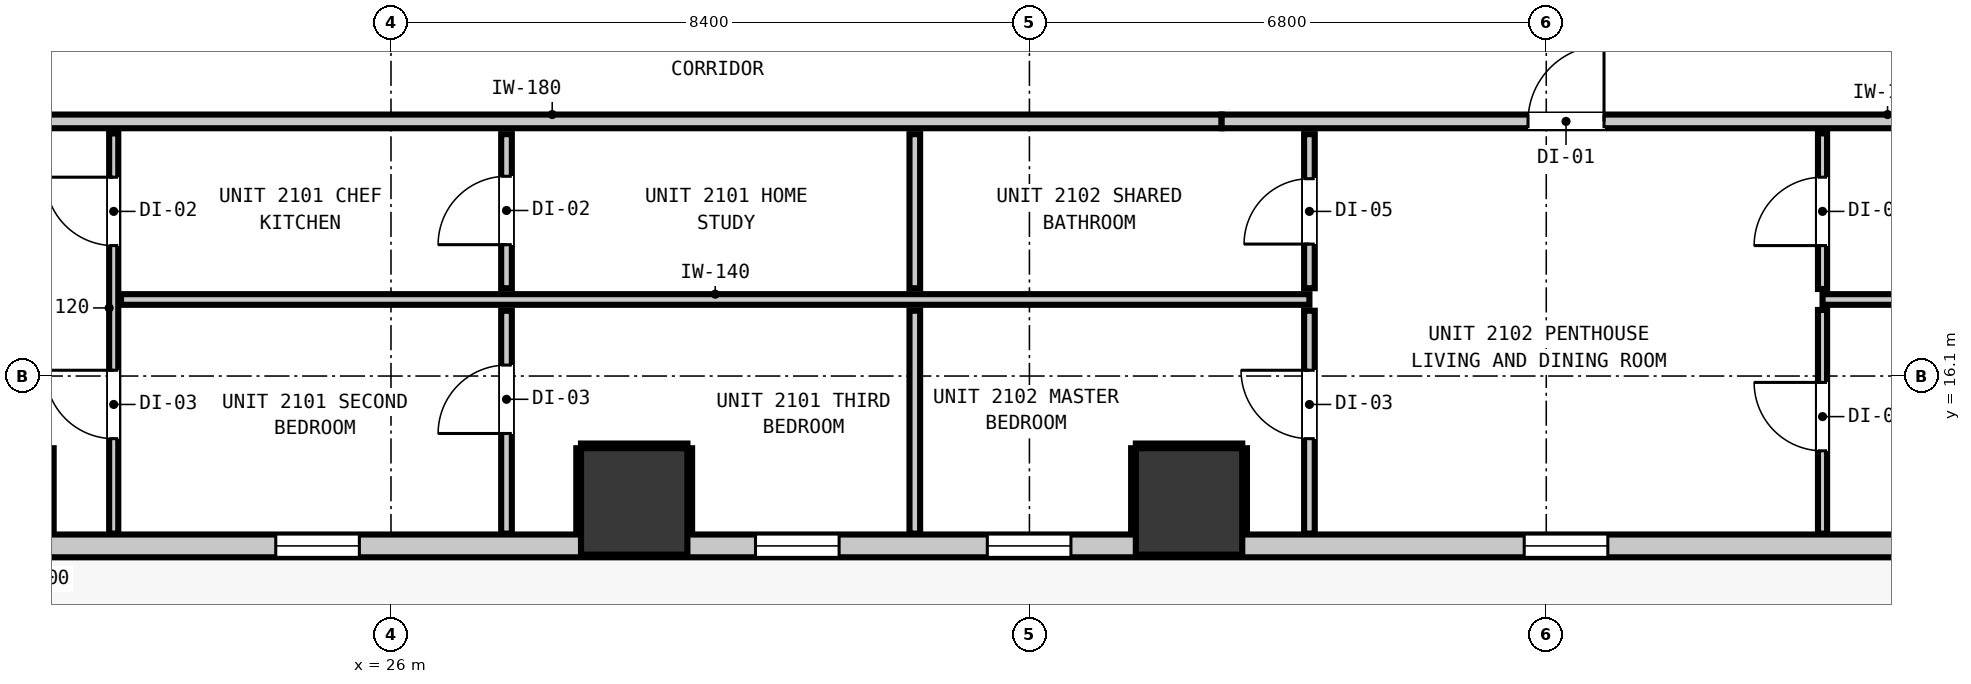
"""IFC4 building model, lengths in metres.
Left out: names, types, materials, properties, quantities, classifications, styles, units other than length and angle.
Written with IfcOpenShell. Run it as: python <this file> out.ifc"""

import sys

from ifc_helpers import new_model, si_unit, direction, frame, frame_2d, origin, origin_2d, place, context, subcontext, project, spatial, rectangle, extrude, element, fill, save


model = new_model("IFC4")
c1 = context("Model", 3, precision=1e-05, world=origin(), true_north=direction((0.0, 1.0)))
c2 = subcontext(c1, "Body", "Model", "MODEL_VIEW")
j1 = project(units=[si_unit("LENGTHUNIT", "METRE"), si_unit("PLANEANGLEUNIT", "RADIAN")], contexts=[c1])
p1 = place(None, origin())
s1 = spatial("IfcSite", under=j1, at=p1, CompositionType="ELEMENT")
p2 = place(p1, origin())
s2 = spatial("IfcBuilding", under=s1, at=p2, CompositionType="ELEMENT")
p3 = place(p2, frame((0.0, 0.0, 75.12)))
s3 = spatial("IfcBuildingStorey", under=s2, at=p3, CompositionType="ELEMENT", Elevation=75.12)
for number, where, z_axis, x_axis in (
    (1, (29.2, 14.45, 0.0), (0.0, 0.0, 1.0), (1.0, 0.0, 0.0)),
    (2, (36.5, 14.45, 0.0), (0.0, 0.0, 1.0), (1.0, 0.0, 0.0)),
):
    element("IfcColumn", number, at=place(p3, frame(where, z_axis=z_axis, x_axis=x_axis)), inside=s3, PredefinedType="COLUMN", context=c2, shape_type="SweptSolid", body=[
        extrude(rectangle(XDim=1.4, YDim=1.4, at=origin_2d()), origin(), (0.0, 0.0, 1.0), 3.32),
    ])
p4 = place(p3, frame((47.835, 13.865, 0.0), z_axis=(0.0, 0.0, 1.0), x_axis=(-1.0, 0.0, 0.0)))
e3 = element("IfcWall", 3, at=p4, inside=s3, PredefinedType="STANDARD", context=c2, shape_type="SweptSolid", body=[
    extrude(rectangle(XDim=37.47, YDim=0.3, at=frame_2d((18.735, 0.0))), origin(), (0.0, 0.0, 1.0), 3.06),
])
p5 = place(p4, frame((0.901, 0.0, 0.0)))
e4 = element("IfcOpeningElement", 4, at=p5, cuts=e3, PredefinedType="OPENING", context=c2, shape_type="SweptSolid", body=[
    extrude(rectangle(XDim=1.0, YDim=2.15, at=frame_2d((0.5, 1.075))), frame((0.0, 0.16, 0.0), z_axis=(0.0, -1.0, 0.0), x_axis=(1.0, 0.0, 0.0)), (0.0, 0.0, 1.0), 0.32),
])
p6 = place(p4, frame((29.695, 0.0, 0.85)))
e5 = element("IfcOpeningElement", 5, at=p6, cuts=e3, PredefinedType="OPENING", context=c2, shape_type="SweptSolid", body=[
    extrude(rectangle(XDim=1.1, YDim=2.05, at=frame_2d((0.55, 1.025))), frame((0.0, 0.16, 0.0), z_axis=(0.0, -1.0, 0.0), x_axis=(1.0, 0.0, 0.0)), (0.0, 0.0, 1.0), 0.32),
])
p7 = place(p4, frame((35.708, 0.0, 0.85)))
e6 = element("IfcOpeningElement", 6, at=p7, cuts=e3, PredefinedType="OPENING", context=c2, shape_type="SweptSolid", body=[
    extrude(rectangle(XDim=1.1, YDim=2.05, at=frame_2d((0.55, 1.025))), frame((0.0, 0.16, 0.0), z_axis=(0.0, -1.0, 0.0), x_axis=(1.0, 0.0, 0.0)), (0.0, 0.0, 1.0), 0.32),
])
p8 = place(p4, frame((22.251, 0.0, 0.85)))
e7 = element("IfcOpeningElement", 7, at=p8, cuts=e3, PredefinedType="OPENING", context=c2, shape_type="SweptSolid", body=[
    extrude(rectangle(XDim=1.1, YDim=2.05, at=frame_2d((0.55, 1.025))), frame((0.0, 0.16, 0.0), z_axis=(0.0, -1.0, 0.0), x_axis=(1.0, 0.0, 0.0)), (0.0, 0.0, 1.0), 0.32),
])
p9 = place(p4, frame((15.939, 0.0, 0.85)))
e8 = element("IfcOpeningElement", 8, at=p9, cuts=e3, PredefinedType="OPENING", context=c2, shape_type="SweptSolid", body=[
    extrude(rectangle(XDim=1.1, YDim=2.05, at=frame_2d((0.55, 1.025))), frame((0.0, 0.16, 0.0), z_axis=(0.0, -1.0, 0.0), x_axis=(1.0, 0.0, 0.0)), (0.0, 0.0, 1.0), 0.32),
])
p10 = place(p4, frame((5.825, 0.0, 0.85)))
e9 = element("IfcOpeningElement", 9, at=p10, cuts=e3, PredefinedType="OPENING", context=c2, shape_type="SweptSolid", body=[
    extrude(rectangle(XDim=1.1, YDim=2.05, at=frame_2d((0.55, 1.025))), frame((0.0, 0.16, 0.0), z_axis=(0.0, -1.0, 0.0), x_axis=(1.0, 0.0, 0.0)), (0.0, 0.0, 1.0), 0.32),
])
p11 = place(p4, frame((12.889, 0.0, 0.85)))
e10 = element("IfcOpeningElement", 10, at=p11, cuts=e3, PredefinedType="OPENING", context=c2, shape_type="SweptSolid", body=[
    extrude(rectangle(XDim=1.1, YDim=2.05, at=frame_2d((0.55, 1.025))), frame((0.0, 0.16, 0.0), z_axis=(0.0, -1.0, 0.0), x_axis=(1.0, 0.0, 0.0)), (0.0, 0.0, 1.0), 0.32),
])
p12 = place(p3, frame((8.027, 19.45, 0.0), z_axis=(0.0, 0.0, 1.0), x_axis=(1.0, 0.0, 0.0)))
e11 = element("IfcWall", 11, at=p12, inside=s3, PredefinedType="PARTITIONING", context=c2, shape_type="SweptSolid", body=[
    extrude(rectangle(XDim=28.902, YDim=0.18, at=frame_2d((14.451, 0.0))), origin(), (0.0, 0.0, 1.0), 3.06),
])
p13 = place(p12, frame((10.187, 0.0, 0.0)))
e12 = element("IfcOpeningElement", 12, at=p13, cuts=e11, PredefinedType="OPENING", context=c2, shape_type="SweptSolid", body=[
    extrude(rectangle(XDim=1.0, YDim=2.15, at=frame_2d((0.5, 1.075))), frame((0.0, 0.1, 0.0), z_axis=(0.0, -1.0, 0.0), x_axis=(1.0, 0.0, 0.0)), (0.0, 0.0, 1.0), 0.2),
])
p14 = place(p3, frame((36.929, 19.45, 0.0), z_axis=(0.0, 0.0, 1.0), x_axis=(1.0, 0.0, 0.0)))
e13 = element("IfcWall", 13, at=p14, inside=s3, PredefinedType="PARTITIONING", context=c2, shape_type="SweptSolid", body=[
    extrude(rectangle(XDim=12.392, YDim=0.18, at=frame_2d((6.196, 0.0))), origin(), (0.0, 0.0, 1.0), 2.445),
])
p15 = place(p14, frame((4.031, 0.0, 0.0)))
e14 = element("IfcOpeningElement", 14, at=p15, cuts=e13, PredefinedType="OPENING", context=c2, shape_type="SweptSolid", body=[
    extrude(rectangle(XDim=1.0, YDim=2.15, at=frame_2d((0.5, 1.075))), frame((0.0, 0.1, 0.0), z_axis=(0.0, -1.0, 0.0), x_axis=(1.0, 0.0, 0.0)), (0.0, 0.0, 1.0), 0.2),
])
p16 = place(p3, frame((22.448, 17.107, 0.0), z_axis=(0.0, 0.0, 1.0), x_axis=(1.0, 0.0, 0.0)))
e15 = element("IfcWall", 15, at=p16, inside=s3, PredefinedType="PARTITIONING", context=c2, shape_type="SweptSolid", body=[
    extrude(rectangle(XDim=15.636, YDim=0.14, at=frame_2d((7.818, 0.0))), origin(), (0.0, 0.0, 1.0), 3.06),
])
p17 = place(p3, frame((44.835, 17.107, 0.0), z_axis=(0.0, 0.0, 1.0), x_axis=(1.0, 0.0, 0.0)))
e16 = element("IfcWall", 16, at=p17, inside=s3, PredefinedType="PARTITIONING", context=c2, shape_type="SweptSolid", body=[
    extrude(rectangle(XDim=5.338, YDim=0.14, at=frame_2d((2.669, 0.0))), origin(), (0.0, 0.0, 1.0), 3.06),
])
p18 = place(p3, frame((27.52, 14.027, 0.0), z_axis=(0.0, 0.0, 1.0), x_axis=(0.0, 1.0, 0.0)))
e17 = element("IfcWall", 17, at=p18, inside=s3, PredefinedType="PARTITIONING", context=c2, shape_type="SweptSolid", body=[
    extrude(rectangle(XDim=2.932, YDim=0.14, at=frame_2d((1.466, 0.0))), origin(), (0.0, 0.0, 1.0), 3.06),
])
p19 = place(p18, frame((1.317, 0.0, 0.0)))
e18 = element("IfcOpeningElement", 18, at=p19, cuts=e17, PredefinedType="OPENING", context=c2, shape_type="SweptSolid", body=[
    extrude(rectangle(XDim=0.9, YDim=2.1, at=frame_2d((0.45, 1.05))), frame((0.0, 0.08, 0.0), z_axis=(0.0, -1.0, 0.0), x_axis=(1.0, 0.0, 0.0)), (0.0, 0.0, 1.0), 0.16),
])
p20 = place(p3, frame((27.52, 17.255, 0.0), z_axis=(0.0, 0.0, 1.0), x_axis=(0.0, 1.0, 0.0)))
e19 = element("IfcWall", 19, at=p20, inside=s3, PredefinedType="PARTITIONING", context=c2, shape_type="SweptSolid", body=[
    extrude(rectangle(XDim=2.027, YDim=0.14, at=frame_2d((1.014, 0.0))), origin(), (0.0, 0.0, 1.0), 3.06),
])
p21 = place(p20, frame((0.573, 0.0, 0.0)))
e20 = element("IfcOpeningElement", 20, at=p21, cuts=e19, PredefinedType="OPENING", context=c2, shape_type="SweptSolid", body=[
    extrude(rectangle(XDim=0.9, YDim=2.1, at=frame_2d((0.45, 1.05))), frame((0.0, 0.08, 0.0), z_axis=(0.0, -1.0, 0.0), x_axis=(1.0, 0.0, 0.0)), (0.0, 0.0, 1.0), 0.16),
])
p22 = place(p3, frame((32.892, 14.027, 0.0), z_axis=(0.0, 0.0, 1.0), x_axis=(0.0, 1.0, 0.0)))
e21 = element("IfcWall", 21, at=p22, inside=s3, PredefinedType="PARTITIONING", context=c2, shape_type="SweptSolid", body=[
    extrude(rectangle(XDim=2.932, YDim=0.14, at=frame_2d((1.466, 0.0))), origin(), (0.0, 0.0, 1.0), 3.06),
])
p23 = place(p3, frame((32.892, 17.255, 0.0), z_axis=(0.0, 0.0, 1.0), x_axis=(0.0, 1.0, 0.0)))
e22 = element("IfcWall", 22, at=p23, inside=s3, PredefinedType="PARTITIONING", context=c2, shape_type="SweptSolid", body=[
    extrude(rectangle(XDim=2.027, YDim=0.14, at=frame_2d((1.014, 0.0))), origin(), (0.0, 0.0, 1.0), 3.06),
])
p24 = place(p3, frame((38.084, 14.027, 0.0), z_axis=(0.0, 0.0, 1.0), x_axis=(0.0, 1.0, 0.0)))
e23 = element("IfcWall", 23, at=p24, inside=s3, PredefinedType="PARTITIONING", context=c2, shape_type="SweptSolid", body=[
    extrude(rectangle(XDim=2.932, YDim=0.14, at=frame_2d((1.466, 0.0))), origin(), (0.0, 0.0, 1.0), 3.06),
])
p25 = place(p24, frame((1.249, 0.0, 0.0)))
e24 = element("IfcOpeningElement", 24, at=p25, cuts=e23, PredefinedType="OPENING", context=c2, shape_type="SweptSolid", body=[
    extrude(rectangle(XDim=0.9, YDim=2.1, at=frame_2d((0.45, 1.05))), frame((0.0, 0.08, 0.0), z_axis=(0.0, -1.0, 0.0), x_axis=(1.0, 0.0, 0.0)), (0.0, 0.0, 1.0), 0.16),
])
p26 = place(p3, frame((38.084, 17.255, 0.0), z_axis=(0.0, 0.0, 1.0), x_axis=(0.0, 1.0, 0.0)))
e25 = element("IfcWall", 25, at=p26, inside=s3, PredefinedType="PARTITIONING", context=c2, shape_type="SweptSolid", body=[
    extrude(rectangle(XDim=2.027, YDim=0.14, at=frame_2d((1.014, 0.0))), origin(), (0.0, 0.0, 1.0), 3.06),
])
p27 = place(p26, frame((0.581, 0.0, 0.0)))
e26 = element("IfcOpeningElement", 26, at=p27, cuts=e25, PredefinedType="OPENING", context=c2, shape_type="SweptSolid", body=[
    extrude(rectangle(XDim=0.86, YDim=2.02, at=frame_2d((0.43, 1.01))), frame((0.0, 0.08, 0.0), z_axis=(0.0, -1.0, 0.0), x_axis=(1.0, 0.0, 0.0)), (0.0, 0.0, 1.0), 0.16),
])
p28 = place(p3, frame((22.352, 14.027, 0.0), z_axis=(0.0, 0.0, 1.0), x_axis=(0.0, 1.0, 0.0)))
e27 = element("IfcWall", 27, at=p28, inside=s3, PredefinedType="PARTITIONING", context=c2, shape_type="SweptSolid", body=[
    extrude(rectangle(XDim=5.265, YDim=0.12, at=frame_2d((2.632, 0.0))), origin(), (0.0, 0.0, 1.0), 3.06),
])
p29 = place(p28, frame((3.789, 0.0, 0.0)))
e28 = element("IfcOpeningElement", 28, at=p29, cuts=e27, PredefinedType="OPENING", context=c2, shape_type="SweptSolid", body=[
    extrude(rectangle(XDim=0.9, YDim=2.1, at=frame_2d((0.45, 1.05))), frame((0.0, 0.07, 0.0), z_axis=(0.0, -1.0, 0.0), x_axis=(1.0, 0.0, 0.0)), (0.0, 0.0, 1.0), 0.14),
])
p30 = place(p28, frame((1.249, 0.0, 0.0)))
e29 = element("IfcOpeningElement", 29, at=p30, cuts=e27, PredefinedType="OPENING", context=c2, shape_type="SweptSolid", body=[
    extrude(rectangle(XDim=0.9, YDim=2.1, at=frame_2d((0.45, 1.05))), frame((0.0, 0.07, 0.0), z_axis=(0.0, -1.0, 0.0), x_axis=(1.0, 0.0, 0.0)), (0.0, 0.0, 1.0), 0.14),
])
p31 = place(p3, frame((44.835, 14.027, 0.0), z_axis=(0.0, 0.0, 1.0), x_axis=(0.0, 1.0, 0.0)))
e30 = element("IfcWall", 30, at=p31, inside=s3, PredefinedType="PARTITIONING", context=c2, shape_type="SweptSolid", body=[
    extrude(rectangle(XDim=2.942, YDim=0.12, at=frame_2d((1.471, 0.0))), origin(), (0.0, 0.0, 1.0), 3.06),
])
p32 = place(p31, frame((1.089, 0.0, 0.0)))
e31 = element("IfcOpeningElement", 31, at=p32, cuts=e30, PredefinedType="OPENING", context=c2, shape_type="SweptSolid", body=[
    extrude(rectangle(XDim=0.9, YDim=2.1, at=frame_2d((0.45, 1.05))), frame((0.0, 0.07, 0.0), z_axis=(0.0, -1.0, 0.0), x_axis=(1.0, 0.0, 0.0)), (0.0, 0.0, 1.0), 0.14),
])
p33 = place(p3, frame((44.835, 17.245, 0.0), z_axis=(0.0, 0.0, 1.0), x_axis=(0.0, 1.0, 0.0)))
e32 = element("IfcWall", 32, at=p33, inside=s3, PredefinedType="PARTITIONING", context=c2, shape_type="SweptSolid", body=[
    extrude(rectangle(XDim=2.047, YDim=0.12, at=frame_2d((1.023, 0.0))), origin(), (0.0, 0.0, 1.0), 3.06),
])
p34 = place(p33, frame((0.571, 0.0, 0.0)))
e33 = element("IfcOpeningElement", 33, at=p34, cuts=e32, PredefinedType="OPENING", context=c2, shape_type="SweptSolid", body=[
    extrude(rectangle(XDim=0.9, YDim=2.1, at=frame_2d((0.45, 1.05))), frame((0.0, 0.07, 0.0), z_axis=(0.0, -1.0, 0.0), x_axis=(1.0, 0.0, 0.0)), (0.0, 0.0, 1.0), 0.14),
])
p35 = place(p3, frame((21.532, 14.03, 0.0), z_axis=(0.0, 0.0, 1.0), x_axis=(0.0, 1.0, 0.0)))
e34 = element("IfcWall", 34, at=p35, inside=s3, PredefinedType="PARTITIONING", context=c2, shape_type="SweptSolid", body=[
    extrude(rectangle(XDim=1.12, YDim=0.06, at=frame_2d((0.56, 0.0))), origin(), (0.0, 0.0, 1.0), 1.45),
])
p36 = place(p3, frame((28.5, 15.182, 0.0), z_axis=(0.0, 0.0, 1.0), x_axis=(1.0, 0.0, 0.0)))
e35 = element("IfcWall", 35, at=p36, inside=s3, PredefinedType="PARTITIONING", context=c2, shape_type="SweptSolid", body=[
    extrude(rectangle(XDim=1.4, YDim=0.06, at=frame_2d((0.7, 0.0))), origin(), (0.0, 0.0, 1.0), 1.45),
])
for number, where, z_axis, x_axis in (
    (36, (28.468, 14.03, 0.0), (0.0, 0.0, 1.0), (0.0, 1.0, 0.0)),
    (37, (29.932, 14.03, 0.0), (0.0, 0.0, 1.0), (0.0, 1.0, 0.0)),
):
    element("IfcWall", number, at=place(p3, frame(where, z_axis=z_axis, x_axis=x_axis)), inside=s3, PredefinedType="PARTITIONING", context=c2, shape_type="SweptSolid", body=[
        extrude(rectangle(XDim=1.12, YDim=0.06, at=frame_2d((0.56, 0.0))), origin(), (0.0, 0.0, 1.0), 1.45),
    ])
p37 = place(p3, frame((35.8, 15.182, 0.0), z_axis=(0.0, 0.0, 1.0), x_axis=(1.0, 0.0, 0.0)))
e38 = element("IfcWall", 38, at=p37, inside=s3, PredefinedType="PARTITIONING", context=c2, shape_type="SweptSolid", body=[
    extrude(rectangle(XDim=1.4, YDim=0.06, at=frame_2d((0.7, 0.0))), origin(), (0.0, 0.0, 1.0), 1.45),
])
for number, where, z_axis, x_axis in (
    (39, (35.768, 14.03, 0.0), (0.0, 0.0, 1.0), (0.0, 1.0, 0.0)),
    (40, (37.232, 14.03, 0.0), (0.0, 0.0, 1.0), (0.0, 1.0, 0.0)),
):
    element("IfcWall", number, at=place(p3, frame(where, z_axis=z_axis, x_axis=x_axis)), inside=s3, PredefinedType="PARTITIONING", context=c2, shape_type="SweptSolid", body=[
        extrude(rectangle(XDim=1.12, YDim=0.06, at=frame_2d((0.56, 0.0))), origin(), (0.0, 0.0, 1.0), 1.45),
    ])
p38 = place(p8, origin())
e41 = element("IfcWindow", 41, at=p38, inside=s3, PartitioningType="SINGLE_PANEL", PredefinedType="WINDOW", context=c2, shape_type="SweptSolid", body=[
    extrude(rectangle(XDim=1.1, YDim=2.05, at=frame_2d((0.55, 1.025))), frame((0.0, 0.03, 0.0), z_axis=(0.0, -1.0, 0.0), x_axis=(1.0, 0.0, 0.0)), (0.0, 0.0, 1.0), 0.06),
])
fill(e7, e41)
p39 = place(p9, origin())
e42 = element("IfcWindow", 42, at=p39, inside=s3, PartitioningType="SINGLE_PANEL", PredefinedType="WINDOW", context=c2, shape_type="SweptSolid", body=[
    extrude(rectangle(XDim=1.1, YDim=2.05, at=frame_2d((0.55, 1.025))), frame((0.0, 0.03, 0.0), z_axis=(0.0, -1.0, 0.0), x_axis=(1.0, 0.0, 0.0)), (0.0, 0.0, 1.0), 0.06),
])
fill(e8, e42)
p40 = place(p10, origin())
e43 = element("IfcWindow", 43, at=p40, inside=s3, PartitioningType="SINGLE_PANEL", PredefinedType="WINDOW", context=c2, shape_type="SweptSolid", body=[
    extrude(rectangle(XDim=1.1, YDim=2.05, at=frame_2d((0.55, 1.025))), frame((0.0, 0.03, 0.0), z_axis=(0.0, -1.0, 0.0), x_axis=(1.0, 0.0, 0.0)), (0.0, 0.0, 1.0), 0.06),
])
fill(e9, e43)
p41 = place(p11, origin())
e44 = element("IfcWindow", 44, at=p41, inside=s3, PartitioningType="SINGLE_PANEL", PredefinedType="WINDOW", context=c2, shape_type="SweptSolid", body=[
    extrude(rectangle(XDim=1.1, YDim=2.05, at=frame_2d((0.55, 1.025))), frame((0.0, 0.03, 0.0), z_axis=(0.0, -1.0, 0.0), x_axis=(1.0, 0.0, 0.0)), (0.0, 0.0, 1.0), 0.06),
])
fill(e10, e44)
p42 = place(p29, origin())
e45 = element("IfcDoor", 45, at=p42, inside=s3, OperationType="SINGLE_SWING_RIGHT", PredefinedType="DOOR", context=c2, shape_type="SweptSolid", body=[
    extrude(rectangle(XDim=0.9, YDim=2.1, at=frame_2d((0.45, 1.05))), frame((0.0, 0.025, 0.0), z_axis=(0.0, -1.0, 0.0), x_axis=(1.0, 0.0, 0.0)), (0.0, 0.0, 1.0), 0.05),
])
fill(e28, e45)
p43 = place(p21, origin())
e46 = element("IfcDoor", 46, at=p43, inside=s3, OperationType="SINGLE_SWING_LEFT", PredefinedType="DOOR", context=c2, shape_type="SweptSolid", body=[
    extrude(rectangle(XDim=0.9, YDim=2.1, at=frame_2d((0.45, 1.05))), frame((0.0, 0.025, 0.0), z_axis=(0.0, -1.0, 0.0), x_axis=(1.0, 0.0, 0.0)), (0.0, 0.0, 1.0), 0.05),
])
fill(e20, e46)
p44 = place(p30, origin())
e47 = element("IfcDoor", 47, at=p44, inside=s3, OperationType="SINGLE_SWING_RIGHT", PredefinedType="DOOR", context=c2, shape_type="SweptSolid", body=[
    extrude(rectangle(XDim=0.9, YDim=2.1, at=frame_2d((0.45, 1.05))), frame((0.0, 0.025, 0.0), z_axis=(0.0, -1.0, 0.0), x_axis=(1.0, 0.0, 0.0)), (0.0, 0.0, 1.0), 0.05),
])
fill(e29, e47)
p45 = place(p19, origin())
e48 = element("IfcDoor", 48, at=p45, inside=s3, OperationType="SINGLE_SWING_LEFT", PredefinedType="DOOR", context=c2, shape_type="SweptSolid", body=[
    extrude(rectangle(XDim=0.9, YDim=2.1, at=frame_2d((0.45, 1.05))), frame((0.0, 0.025, 0.0), z_axis=(0.0, -1.0, 0.0), x_axis=(1.0, 0.0, 0.0)), (0.0, 0.0, 1.0), 0.05),
])
fill(e18, e48)
p46 = place(p15, origin())
e49 = element("IfcDoor", 49, at=p46, inside=s3, OperationType="SINGLE_SWING_RIGHT", PredefinedType="DOOR", context=c2, shape_type="SweptSolid", body=[
    extrude(rectangle(XDim=1.0, YDim=2.15, at=frame_2d((0.5, 1.075))), frame((0.0, 0.025, 0.0), z_axis=(0.0, -1.0, 0.0), x_axis=(1.0, 0.0, 0.0)), (0.0, 0.0, 1.0), 0.05),
])
fill(e14, e49)
p47 = place(p27, origin())
e50 = element("IfcDoor", 50, at=p47, inside=s3, OperationType="SINGLE_SWING_LEFT", PredefinedType="DOOR", context=c2, shape_type="SweptSolid", body=[
    extrude(rectangle(XDim=0.86, YDim=2.02, at=frame_2d((0.43, 1.01))), frame((0.0, 0.025, 0.0), z_axis=(0.0, -1.0, 0.0), x_axis=(1.0, 0.0, 0.0)), (0.0, 0.0, 1.0), 0.05),
])
fill(e26, e50)
p48 = place(p25, origin())
e51 = element("IfcDoor", 51, at=p48, inside=s3, OperationType="SINGLE_SWING_RIGHT", PredefinedType="DOOR", context=c2, shape_type="SweptSolid", body=[
    extrude(rectangle(XDim=0.9, YDim=2.1, at=frame_2d((0.45, 1.05))), frame((0.0, 0.025, 0.0), z_axis=(0.0, -1.0, 0.0), x_axis=(1.0, 0.0, 0.0)), (0.0, 0.0, 1.0), 0.05),
])
fill(e24, e51)
p49 = place(p34, origin())
e52 = element("IfcDoor", 52, at=p49, inside=s3, OperationType="SINGLE_SWING_LEFT", PredefinedType="DOOR", context=c2, shape_type="SweptSolid", body=[
    extrude(rectangle(XDim=0.9, YDim=2.1, at=frame_2d((0.45, 1.05))), frame((0.0, 0.025, 0.0), z_axis=(0.0, -1.0, 0.0), x_axis=(1.0, 0.0, 0.0)), (0.0, 0.0, 1.0), 0.05),
])
fill(e33, e52)
p50 = place(p32, origin())
e53 = element("IfcDoor", 53, at=p50, inside=s3, OperationType="SINGLE_SWING_RIGHT", PredefinedType="DOOR", context=c2, shape_type="SweptSolid", body=[
    extrude(rectangle(XDim=0.9, YDim=2.1, at=frame_2d((0.45, 1.05))), frame((0.0, 0.025, 0.0), z_axis=(0.0, -1.0, 0.0), x_axis=(1.0, 0.0, 0.0)), (0.0, 0.0, 1.0), 0.05),
])
fill(e31, e53)
save(model, sys.argv[1])
